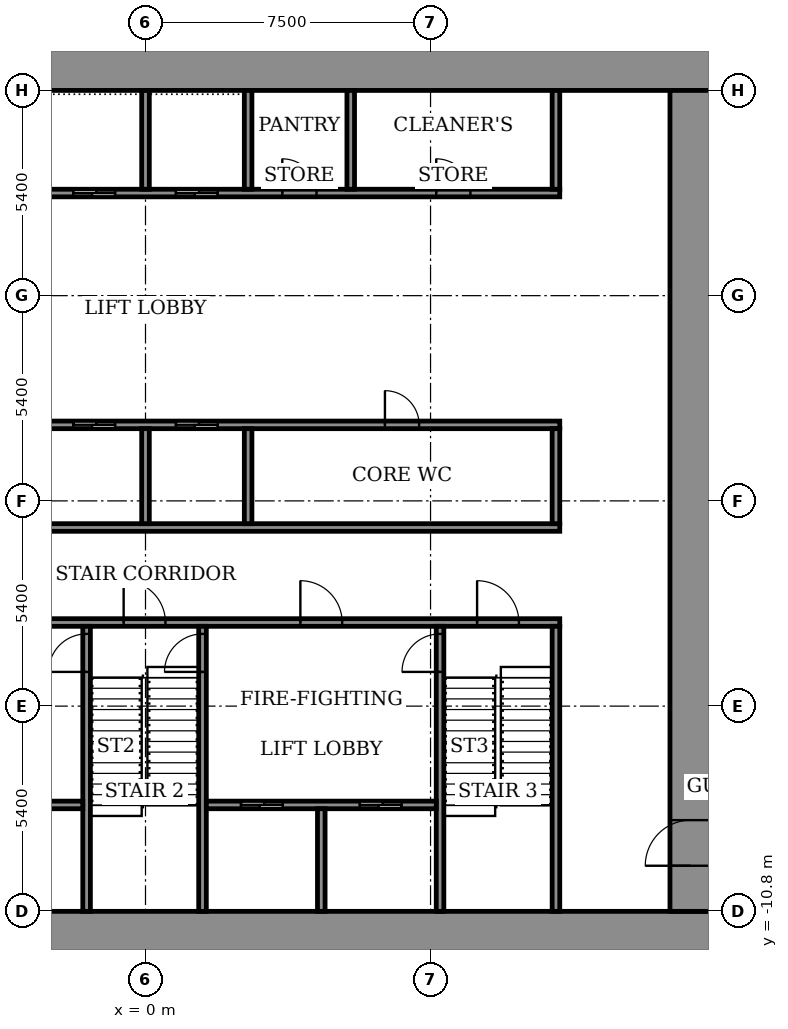
"""IFC4 building model, lengths in metres.
Left out: names, types, materials, properties, quantities, classifications, styles, units other than length and angle.
Written with IfcOpenShell. Run it as: python <this file> out.ifc"""

import sys

from ifc_helpers import new_model, si_unit, direction, frame, frame_2d, origin, place, context, subcontext, project, spatial, rectangle, extrude, element, fill, save


model = new_model("IFC4")
c1 = context("Model", 3, precision=1e-05, world=origin(), true_north=direction((0.0, 1.0)))
c2 = subcontext(c1, "Body", "Model", "MODEL_VIEW")
j1 = project(units=[si_unit("LENGTHUNIT", "METRE"), si_unit("PLANEANGLEUNIT", "RADIAN")], contexts=[c1])
p1 = place(None, origin())
s1 = spatial("IfcSite", under=j1, at=p1, CompositionType="ELEMENT")
p2 = place(p1, origin())
s2 = spatial("IfcBuilding", under=s1, at=p2, CompositionType="ELEMENT")
p3 = place(p2, frame((0.0, 0.0, 74.7)))
s3 = spatial("IfcBuildingStorey", under=s2, at=p3, CompositionType="ELEMENT", Elevation=74.7)
for number, where, z_axis, x_axis in (
    (1, (-14.9, -11.35, 0.0), (0.0, 0.0, 1.0), (1.0, 0.0, 0.0)),
    (2, (-14.9, 11.35, 0.0), (0.0, 0.0, 1.0), (1.0, 0.0, 0.0)),
):
    element("IfcWall", number, at=place(p3, frame(where, z_axis=z_axis, x_axis=x_axis)), inside=s3, PredefinedType="SHEAR", context=c2, shape_type="SweptSolid", body=[
        extrude(rectangle(XDim=29.8, YDim=1.1, at=frame_2d((14.9, 0.0))), origin(), (0.0, 0.0, 1.0), 4.6),
    ])
p4 = place(p3, frame((14.35, -10.8, 0.0), z_axis=(0.0, 0.0, 1.0), x_axis=(0.0, 1.0, 0.0)))
e3 = element("IfcWall", 3, at=p4, inside=s3, PredefinedType="SHEAR", context=c2, shape_type="SweptSolid", body=[
    extrude(rectangle(XDim=21.6, YDim=1.1, at=frame_2d((10.8, 0.0))), origin(), (0.0, 0.0, 1.0), 4.6),
])
p5 = place(p4, frame((1.2, 0.0, 0.0)))
e4 = element("IfcOpeningElement", 4, at=p5, cuts=e3, PredefinedType="OPENING", context=c2, shape_type="SweptSolid", body=[
    extrude(rectangle(XDim=1.2, YDim=2.1, at=frame_2d((0.6, 1.05))), frame((0.0, 0.56, 0.0), z_axis=(0.0, -1.0, 0.0), x_axis=(1.0, 0.0, 0.0)), (0.0, 0.0, 1.0), 1.12),
])
p6 = place(p3, frame((-10.9, -3.2, 0.0), z_axis=(0.0, 0.0, 1.0), x_axis=(1.0, 0.0, 0.0)))
e5 = element("IfcWall", 5, at=p6, inside=s3, PredefinedType="SHEAR", context=c2, shape_type="SweptSolid", body=[
    extrude(rectangle(XDim=21.8, YDim=0.2, at=frame_2d((10.9, 0.0))), origin(), (0.0, 0.0, 1.0), 4.05),
])
p7 = place(p6, frame((1.075, 0.0, 0.0)))
e6 = element("IfcOpeningElement", 6, at=p7, cuts=e5, PredefinedType="OPENING", context=c2, shape_type="SweptSolid", body=[
    extrude(rectangle(XDim=1.1, YDim=2.1, at=frame_2d((0.55, 1.05))), frame((0.0, 0.11, 0.0), z_axis=(0.0, -1.0, 0.0), x_axis=(1.0, 0.0, 0.0)), (0.0, 0.0, 1.0), 0.22),
])
p8 = place(p6, frame((10.325, 0.0, 0.0)))
e7 = element("IfcOpeningElement", 7, at=p8, cuts=e5, PredefinedType="OPENING", context=c2, shape_type="SweptSolid", body=[
    extrude(rectangle(XDim=1.1, YDim=2.1, at=frame_2d((0.55, 1.05))), frame((0.0, 0.11, 0.0), z_axis=(0.0, -1.0, 0.0), x_axis=(1.0, 0.0, 0.0)), (0.0, 0.0, 1.0), 0.22),
])
p9 = place(p6, frame((19.625, 0.0, 0.0)))
e8 = element("IfcOpeningElement", 8, at=p9, cuts=e5, PredefinedType="OPENING", context=c2, shape_type="SweptSolid", body=[
    extrude(rectangle(XDim=1.1, YDim=2.1, at=frame_2d((0.55, 1.05))), frame((0.0, 0.11, 0.0), z_axis=(0.0, -1.0, 0.0), x_axis=(1.0, 0.0, 0.0)), (0.0, 0.0, 1.0), 0.22),
])
p10 = place(p6, frame((5.7, 0.0, 0.0)))
e9 = element("IfcOpeningElement", 9, at=p10, cuts=e5, PredefinedType="OPENING", context=c2, shape_type="SweptSolid", body=[
    extrude(rectangle(XDim=1.1, YDim=2.1, at=frame_2d((0.55, 1.05))), frame((0.0, 0.11, 0.0), z_axis=(0.0, -1.0, 0.0), x_axis=(1.0, 0.0, 0.0)), (0.0, 0.0, 1.0), 0.22),
])
p11 = place(p6, frame((14.975, 0.0, 0.0)))
e10 = element("IfcOpeningElement", 10, at=p11, cuts=e5, PredefinedType="OPENING", context=c2, shape_type="SweptSolid", body=[
    extrude(rectangle(XDim=1.1, YDim=2.1, at=frame_2d((0.55, 1.05))), frame((0.0, 0.11, 0.0), z_axis=(0.0, -1.0, 0.0), x_axis=(1.0, 0.0, 0.0)), (0.0, 0.0, 1.0), 0.22),
])
p12 = place(p3, frame((-10.9, -0.7, 0.0), z_axis=(0.0, 0.0, 1.0), x_axis=(1.0, 0.0, 0.0)))
e11 = element("IfcWall", 11, at=p12, inside=s3, PredefinedType="SHEAR", context=c2, shape_type="SweptSolid", body=[
    extrude(rectangle(XDim=21.8, YDim=0.2, at=frame_2d((10.9, 0.0))), origin(), (0.0, 0.0, 1.0), 4.05),
])
p13 = place(p3, frame((-10.9, 2.0, 0.0), z_axis=(0.0, 0.0, 1.0), x_axis=(1.0, 0.0, 0.0)))
e12 = element("IfcWall", 12, at=p13, inside=s3, PredefinedType="SHEAR", context=c2, shape_type="SweptSolid", body=[
    extrude(rectangle(XDim=21.8, YDim=0.2, at=frame_2d((10.9, 0.0))), origin(), (0.0, 0.0, 1.0), 4.05),
])
p14 = place(p13, frame((0.9, 0.0, 0.0)))
e13 = element("IfcOpeningElement", 13, at=p14, cuts=e12, PredefinedType="OPENING", context=c2, shape_type="SweptSolid", body=[
    extrude(rectangle(XDim=1.1, YDim=2.1, at=frame_2d((0.55, 1.05))), frame((0.0, 0.11, 0.0), z_axis=(0.0, -1.0, 0.0), x_axis=(1.0, 0.0, 0.0)), (0.0, 0.0, 1.0), 0.22),
])
p15 = place(p13, frame((3.6, 0.0, 0.0)))
e14 = element("IfcOpeningElement", 14, at=p15, cuts=e12, PredefinedType="OPENING", context=c2, shape_type="SweptSolid", body=[
    extrude(rectangle(XDim=1.1, YDim=2.1, at=frame_2d((0.55, 1.05))), frame((0.0, 0.11, 0.0), z_axis=(0.0, -1.0, 0.0), x_axis=(1.0, 0.0, 0.0)), (0.0, 0.0, 1.0), 0.22),
])
p16 = place(p13, frame((6.3, 0.0, 0.0)))
e15 = element("IfcOpeningElement", 15, at=p16, cuts=e12, PredefinedType="OPENING", context=c2, shape_type="SweptSolid", body=[
    extrude(rectangle(XDim=1.1, YDim=2.1, at=frame_2d((0.55, 1.05))), frame((0.0, 0.11, 0.0), z_axis=(0.0, -1.0, 0.0), x_axis=(1.0, 0.0, 0.0)), (0.0, 0.0, 1.0), 0.22),
])
p17 = place(p13, frame((9.0, 0.0, 0.0)))
e16 = element("IfcOpeningElement", 16, at=p17, cuts=e12, PredefinedType="OPENING", context=c2, shape_type="SweptSolid", body=[
    extrude(rectangle(XDim=1.1, YDim=2.1, at=frame_2d((0.55, 1.05))), frame((0.0, 0.11, 0.0), z_axis=(0.0, -1.0, 0.0), x_axis=(1.0, 0.0, 0.0)), (0.0, 0.0, 1.0), 0.22),
])
p18 = place(p13, frame((11.7, 0.0, 0.0)))
e17 = element("IfcOpeningElement", 17, at=p18, cuts=e12, PredefinedType="OPENING", context=c2, shape_type="SweptSolid", body=[
    extrude(rectangle(XDim=1.1, YDim=2.1, at=frame_2d((0.55, 1.05))), frame((0.0, 0.11, 0.0), z_axis=(0.0, -1.0, 0.0), x_axis=(1.0, 0.0, 0.0)), (0.0, 0.0, 1.0), 0.22),
])
p19 = place(p13, frame((17.2, 0.0, 0.0)))
e18 = element("IfcOpeningElement", 18, at=p19, cuts=e12, PredefinedType="OPENING", context=c2, shape_type="SweptSolid", body=[
    extrude(rectangle(XDim=0.9, YDim=2.1, at=frame_2d((0.45, 1.05))), frame((0.0, 0.11, 0.0), z_axis=(0.0, -1.0, 0.0), x_axis=(1.0, 0.0, 0.0)), (0.0, 0.0, 1.0), 0.22),
])
p20 = place(p3, frame((-10.9, 8.1, 0.0), z_axis=(0.0, 0.0, 1.0), x_axis=(1.0, 0.0, 0.0)))
e19 = element("IfcWall", 19, at=p20, inside=s3, PredefinedType="SHEAR", context=c2, shape_type="SweptSolid", body=[
    extrude(rectangle(XDim=21.8, YDim=0.2, at=frame_2d((10.9, 0.0))), origin(), (0.0, 0.0, 1.0), 4.05),
])
p21 = place(p20, frame((0.9, 0.0, 0.0)))
e20 = element("IfcOpeningElement", 20, at=p21, cuts=e19, PredefinedType="OPENING", context=c2, shape_type="SweptSolid", body=[
    extrude(rectangle(XDim=1.1, YDim=2.1, at=frame_2d((0.55, 1.05))), frame((0.0, 0.11, 0.0), z_axis=(0.0, -1.0, 0.0), x_axis=(1.0, 0.0, 0.0)), (0.0, 0.0, 1.0), 0.22),
])
p22 = place(p20, frame((3.6, 0.0, 0.0)))
e21 = element("IfcOpeningElement", 21, at=p22, cuts=e19, PredefinedType="OPENING", context=c2, shape_type="SweptSolid", body=[
    extrude(rectangle(XDim=1.1, YDim=2.1, at=frame_2d((0.55, 1.05))), frame((0.0, 0.11, 0.0), z_axis=(0.0, -1.0, 0.0), x_axis=(1.0, 0.0, 0.0)), (0.0, 0.0, 1.0), 0.22),
])
p23 = place(p20, frame((6.3, 0.0, 0.0)))
e22 = element("IfcOpeningElement", 22, at=p23, cuts=e19, PredefinedType="OPENING", context=c2, shape_type="SweptSolid", body=[
    extrude(rectangle(XDim=1.1, YDim=2.1, at=frame_2d((0.55, 1.05))), frame((0.0, 0.11, 0.0), z_axis=(0.0, -1.0, 0.0), x_axis=(1.0, 0.0, 0.0)), (0.0, 0.0, 1.0), 0.22),
])
p24 = place(p20, frame((9.0, 0.0, 0.0)))
e23 = element("IfcOpeningElement", 23, at=p24, cuts=e19, PredefinedType="OPENING", context=c2, shape_type="SweptSolid", body=[
    extrude(rectangle(XDim=1.1, YDim=2.1, at=frame_2d((0.55, 1.05))), frame((0.0, 0.11, 0.0), z_axis=(0.0, -1.0, 0.0), x_axis=(1.0, 0.0, 0.0)), (0.0, 0.0, 1.0), 0.22),
])
p25 = place(p20, frame((11.7, 0.0, 0.0)))
e24 = element("IfcOpeningElement", 24, at=p25, cuts=e19, PredefinedType="OPENING", context=c2, shape_type="SweptSolid", body=[
    extrude(rectangle(XDim=1.1, YDim=2.1, at=frame_2d((0.55, 1.05))), frame((0.0, 0.11, 0.0), z_axis=(0.0, -1.0, 0.0), x_axis=(1.0, 0.0, 0.0)), (0.0, 0.0, 1.0), 0.22),
])
p26 = place(p20, frame((14.5, 0.0, 0.0)))
e25 = element("IfcOpeningElement", 25, at=p26, cuts=e19, PredefinedType="OPENING", context=c2, shape_type="SweptSolid", body=[
    extrude(rectangle(XDim=0.9, YDim=2.1, at=frame_2d((0.45, 1.05))), frame((0.0, 0.11, 0.0), z_axis=(0.0, -1.0, 0.0), x_axis=(1.0, 0.0, 0.0)), (0.0, 0.0, 1.0), 0.22),
])
p27 = place(p20, frame((18.55, 0.0, 0.0)))
e26 = element("IfcOpeningElement", 26, at=p27, cuts=e19, PredefinedType="OPENING", context=c2, shape_type="SweptSolid", body=[
    extrude(rectangle(XDim=0.9, YDim=2.1, at=frame_2d((0.45, 1.05))), frame((0.0, 0.11, 0.0), z_axis=(0.0, -1.0, 0.0), x_axis=(1.0, 0.0, 0.0)), (0.0, 0.0, 1.0), 0.22),
])
p28 = place(p3, frame((-1.55, -10.8, 0.0), z_axis=(0.0, 0.0, 1.0), x_axis=(0.0, 1.0, 0.0)))
e27 = element("IfcWall", 27, at=p28, inside=s3, PredefinedType="SHEAR", context=c2, shape_type="SweptSolid", body=[
    extrude(rectangle(XDim=7.5, YDim=0.2, at=frame_2d((3.75, 0.0))), origin(), (0.0, 0.0, 1.0), 4.05),
])
p29 = place(p28, frame((6.3, 0.0, 0.0)))
e28 = element("IfcOpeningElement", 28, at=p29, cuts=e27, PredefinedType="OPENING", context=c2, shape_type="SweptSolid", body=[
    extrude(rectangle(XDim=1.0, YDim=2.1, at=frame_2d((0.5, 1.05))), frame((0.0, 0.11, 0.0), z_axis=(0.0, -1.0, 0.0), x_axis=(1.0, 0.0, 0.0)), (0.0, 0.0, 1.0), 0.22),
])
p30 = place(p3, frame((1.5, -10.8, 0.0), z_axis=(0.0, 0.0, 1.0), x_axis=(0.0, 1.0, 0.0)))
e29 = element("IfcWall", 29, at=p30, inside=s3, PredefinedType="SHEAR", context=c2, shape_type="SweptSolid", body=[
    extrude(rectangle(XDim=7.5, YDim=0.2, at=frame_2d((3.75, 0.0))), origin(), (0.0, 0.0, 1.0), 4.05),
])
p31 = place(p30, frame((6.3, 0.0, 0.0)))
e30 = element("IfcOpeningElement", 30, at=p31, cuts=e29, PredefinedType="OPENING", context=c2, shape_type="SweptSolid", body=[
    extrude(rectangle(XDim=1.0, YDim=2.1, at=frame_2d((0.5, 1.05))), frame((0.0, 0.11, 0.0), z_axis=(0.0, -1.0, 0.0), x_axis=(1.0, 0.0, 0.0)), (0.0, 0.0, 1.0), 0.22),
])
p32 = place(p3, frame((7.75, -10.8, 0.0), z_axis=(0.0, 0.0, 1.0), x_axis=(0.0, 1.0, 0.0)))
e31 = element("IfcWall", 31, at=p32, inside=s3, PredefinedType="SHEAR", context=c2, shape_type="SweptSolid", body=[
    extrude(rectangle(XDim=7.5, YDim=0.2, at=frame_2d((3.75, 0.0))), origin(), (0.0, 0.0, 1.0), 4.05),
])
p33 = place(p32, frame((6.3, 0.0, 0.0)))
e32 = element("IfcOpeningElement", 32, at=p33, cuts=e31, PredefinedType="OPENING", context=c2, shape_type="SweptSolid", body=[
    extrude(rectangle(XDim=1.0, YDim=2.1, at=frame_2d((0.5, 1.05))), frame((0.0, 0.11, 0.0), z_axis=(0.0, -1.0, 0.0), x_axis=(1.0, 0.0, 0.0)), (0.0, 0.0, 1.0), 0.22),
])
p34 = place(p3, frame((10.8, -10.8, 0.0), z_axis=(0.0, 0.0, 1.0), x_axis=(0.0, 1.0, 0.0)))
e33 = element("IfcWall", 33, at=p34, inside=s3, PredefinedType="SHEAR", context=c2, shape_type="SweptSolid", body=[
    extrude(rectangle(XDim=7.5, YDim=0.2, at=frame_2d((3.75, 0.0))), origin(), (0.0, 0.0, 1.0), 4.05),
])
p35 = place(p3, frame((-7.65, -8.0, 0.0), z_axis=(0.0, 0.0, 1.0), x_axis=(1.0, 0.0, 0.0)))
e34 = element("IfcWall", 34, at=p35, inside=s3, PredefinedType="SHEAR", context=c2, shape_type="SweptSolid", body=[
    extrude(rectangle(XDim=6.0, YDim=0.2, at=frame_2d((3.0, 0.0))), origin(), (0.0, 0.0, 1.0), 4.05),
])
p36 = place(p35, frame((0.9, 0.0, 0.0)))
e35 = element("IfcOpeningElement", 35, at=p36, cuts=e34, PredefinedType="OPENING", context=c2, shape_type="SweptSolid", body=[
    extrude(rectangle(XDim=1.1, YDim=2.1, at=frame_2d((0.55, 1.05))), frame((0.0, 0.11, 0.0), z_axis=(0.0, -1.0, 0.0), x_axis=(1.0, 0.0, 0.0)), (0.0, 0.0, 1.0), 0.22),
])
p37 = place(p35, frame((4.0, 0.0, 0.0)))
e36 = element("IfcOpeningElement", 36, at=p37, cuts=e34, PredefinedType="OPENING", context=c2, shape_type="SweptSolid", body=[
    extrude(rectangle(XDim=1.1, YDim=2.1, at=frame_2d((0.55, 1.05))), frame((0.0, 0.11, 0.0), z_axis=(0.0, -1.0, 0.0), x_axis=(1.0, 0.0, 0.0)), (0.0, 0.0, 1.0), 0.22),
])
p38 = place(p3, frame((1.6, -8.0, 0.0), z_axis=(0.0, 0.0, 1.0), x_axis=(1.0, 0.0, 0.0)))
e37 = element("IfcWall", 37, at=p38, inside=s3, PredefinedType="SHEAR", context=c2, shape_type="SweptSolid", body=[
    extrude(rectangle(XDim=6.05, YDim=0.2, at=frame_2d((3.025, 0.0))), origin(), (0.0, 0.0, 1.0), 4.05),
])
p39 = place(p38, frame((0.913, 0.0, 0.0)))
e38 = element("IfcOpeningElement", 38, at=p39, cuts=e37, PredefinedType="OPENING", context=c2, shape_type="SweptSolid", body=[
    extrude(rectangle(XDim=1.1, YDim=2.1, at=frame_2d((0.55, 1.05))), frame((0.0, 0.11, 0.0), z_axis=(0.0, -1.0, 0.0), x_axis=(1.0, 0.0, 0.0)), (0.0, 0.0, 1.0), 0.22),
])
p40 = place(p38, frame((4.038, 0.0, 0.0)))
e39 = element("IfcOpeningElement", 39, at=p40, cuts=e37, PredefinedType="OPENING", context=c2, shape_type="SweptSolid", body=[
    extrude(rectangle(XDim=1.1, YDim=2.1, at=frame_2d((0.55, 1.05))), frame((0.0, 0.11, 0.0), z_axis=(0.0, -1.0, 0.0), x_axis=(1.0, 0.0, 0.0)), (0.0, 0.0, 1.0), 0.22),
])
p41 = place(p3, frame((4.625, -10.8, 0.0), z_axis=(0.0, 0.0, 1.0), x_axis=(0.0, 1.0, 0.0)))
e40 = element("IfcWall", 40, at=p41, inside=s3, PredefinedType="SHEAR", context=c2, shape_type="SweptSolid", body=[
    extrude(rectangle(XDim=2.7, YDim=0.2, at=frame_2d((1.35, 0.0))), origin(), (0.0, 0.0, 1.0), 4.05),
])
for number, where, z_axis, x_axis in (
    (41, (0.0, -0.6, 0.0), (0.0, 0.0, 1.0), (0.0, 1.0, 0.0)),
    (42, (2.7, -0.6, 0.0), (0.0, 0.0, 1.0), (0.0, 1.0, 0.0)),
):
    element("IfcWall", number, at=place(p3, frame(where, z_axis=z_axis, x_axis=x_axis)), inside=s3, PredefinedType="SHEAR", context=c2, shape_type="SweptSolid", body=[
        extrude(rectangle(XDim=2.5, YDim=0.2, at=frame_2d((1.25, 0.0))), origin(), (0.0, 0.0, 1.0), 4.05),
    ])
p42 = place(p3, frame((10.8, -0.6, 0.0), z_axis=(0.0, 0.0, 1.0), x_axis=(0.0, 1.0, 0.0)))
e43 = element("IfcWall", 43, at=p42, inside=s3, PredefinedType="STANDARD", context=c2, shape_type="SweptSolid", body=[
    extrude(rectangle(XDim=2.5, YDim=0.2, at=frame_2d((1.25, 0.0))), origin(), (0.0, 0.0, 1.0), 4.05),
])
for number, where, z_axis, x_axis in (
    (44, (0.0, 8.2, 0.0), (0.0, 0.0, 1.0), (0.0, 1.0, 0.0)),
    (45, (2.7, 8.2, 0.0), (0.0, 0.0, 1.0), (0.0, 1.0, 0.0)),
):
    element("IfcWall", number, at=place(p3, frame(where, z_axis=z_axis, x_axis=x_axis)), inside=s3, PredefinedType="SHEAR", context=c2, shape_type="SweptSolid", body=[
        extrude(rectangle(XDim=2.6, YDim=0.2, at=frame_2d((1.3, 0.0))), origin(), (0.0, 0.0, 1.0), 4.05),
    ])
for number, where, z_axis, x_axis in (
    (46, (5.4, 8.2, 0.0), (0.0, 0.0, 1.0), (0.0, 1.0, 0.0)),
    (47, (10.8, 8.2, 0.0), (0.0, 0.0, 1.0), (0.0, 1.0, 0.0)),
):
    element("IfcWall", number, at=place(p3, frame(where, z_axis=z_axis, x_axis=x_axis)), inside=s3, PredefinedType="STANDARD", context=c2, shape_type="SweptSolid", body=[
        extrude(rectangle(XDim=2.6, YDim=0.2, at=frame_2d((1.3, 0.0))), origin(), (0.0, 0.0, 1.0), 4.05),
    ])
p43 = place(p5, origin())
e48 = element("IfcDoor", 48, at=p43, inside=s3, OperationType="DOUBLE_DOOR_SINGLE_SWING", PredefinedType="DOOR", context=c2, shape_type="SweptSolid", body=[
    extrude(rectangle(XDim=1.2, YDim=2.1, at=frame_2d((0.6, 1.05))), frame((0.0, 0.025, 0.0), z_axis=(0.0, -1.0, 0.0), x_axis=(1.0, 0.0, 0.0)), (0.0, 0.0, 1.0), 0.05),
])
fill(e4, e48)
p44 = place(p17, origin())
e49 = element("IfcDoor", 49, at=p44, inside=s3, OperationType="SLIDING_TO_LEFT", PredefinedType="DOOR", context=c2, shape_type="SweptSolid", body=[
    extrude(rectangle(XDim=1.1, YDim=2.1, at=frame_2d((0.55, 1.05))), frame((0.0, 0.025, 0.0), z_axis=(0.0, -1.0, 0.0), x_axis=(1.0, 0.0, 0.0)), (0.0, 0.0, 1.0), 0.05),
])
fill(e16, e49)
p45 = place(p18, origin())
e50 = element("IfcDoor", 50, at=p45, inside=s3, OperationType="SLIDING_TO_LEFT", PredefinedType="DOOR", context=c2, shape_type="SweptSolid", body=[
    extrude(rectangle(XDim=1.1, YDim=2.1, at=frame_2d((0.55, 1.05))), frame((0.0, 0.025, 0.0), z_axis=(0.0, -1.0, 0.0), x_axis=(1.0, 0.0, 0.0)), (0.0, 0.0, 1.0), 0.05),
])
fill(e17, e50)
p46 = place(p24, origin())
e51 = element("IfcDoor", 51, at=p46, inside=s3, OperationType="SLIDING_TO_LEFT", PredefinedType="DOOR", context=c2, shape_type="SweptSolid", body=[
    extrude(rectangle(XDim=1.1, YDim=2.1, at=frame_2d((0.55, 1.05))), frame((0.0, 0.025, 0.0), z_axis=(0.0, -1.0, 0.0), x_axis=(1.0, 0.0, 0.0)), (0.0, 0.0, 1.0), 0.05),
])
fill(e23, e51)
p47 = place(p25, origin())
e52 = element("IfcDoor", 52, at=p47, inside=s3, OperationType="SLIDING_TO_LEFT", PredefinedType="DOOR", context=c2, shape_type="SweptSolid", body=[
    extrude(rectangle(XDim=1.1, YDim=2.1, at=frame_2d((0.55, 1.05))), frame((0.0, 0.025, 0.0), z_axis=(0.0, -1.0, 0.0), x_axis=(1.0, 0.0, 0.0)), (0.0, 0.0, 1.0), 0.05),
])
fill(e24, e52)
p48 = place(p19, origin())
e53 = element("IfcDoor", 53, at=p48, inside=s3, OperationType="SINGLE_SWING_RIGHT", PredefinedType="DOOR", context=c2, shape_type="SweptSolid", body=[
    extrude(rectangle(XDim=0.9, YDim=2.1, at=frame_2d((0.45, 1.05))), frame((0.0, 0.025, 0.0), z_axis=(0.0, -1.0, 0.0), x_axis=(1.0, 0.0, 0.0)), (0.0, 0.0, 1.0), 0.05),
])
fill(e18, e53)
p49 = place(p26, origin())
e54 = element("IfcDoor", 54, at=p49, inside=s3, OperationType="SINGLE_SWING_RIGHT", PredefinedType="DOOR", context=c2, shape_type="SweptSolid", body=[
    extrude(rectangle(XDim=0.9, YDim=2.1, at=frame_2d((0.45, 1.05))), frame((0.0, 0.025, 0.0), z_axis=(0.0, -1.0, 0.0), x_axis=(1.0, 0.0, 0.0)), (0.0, 0.0, 1.0), 0.05),
])
fill(e25, e54)
p50 = place(p27, origin())
e55 = element("IfcDoor", 55, at=p50, inside=s3, OperationType="SINGLE_SWING_RIGHT", PredefinedType="DOOR", context=c2, shape_type="SweptSolid", body=[
    extrude(rectangle(XDim=0.9, YDim=2.1, at=frame_2d((0.45, 1.05))), frame((0.0, 0.025, 0.0), z_axis=(0.0, -1.0, 0.0), x_axis=(1.0, 0.0, 0.0)), (0.0, 0.0, 1.0), 0.05),
])
fill(e26, e55)
p51 = place(p39, origin())
e56 = element("IfcDoor", 56, at=p51, inside=s3, OperationType="SLIDING_TO_LEFT", PredefinedType="DOOR", context=c2, shape_type="SweptSolid", body=[
    extrude(rectangle(XDim=1.1, YDim=2.1, at=frame_2d((0.55, 1.05))), frame((0.0, 0.025, 0.0), z_axis=(0.0, -1.0, 0.0), x_axis=(1.0, 0.0, 0.0)), (0.0, 0.0, 1.0), 0.05),
])
fill(e38, e56)
p52 = place(p40, origin())
e57 = element("IfcDoor", 57, at=p52, inside=s3, OperationType="SLIDING_TO_LEFT", PredefinedType="DOOR", context=c2, shape_type="SweptSolid", body=[
    extrude(rectangle(XDim=1.1, YDim=2.1, at=frame_2d((0.55, 1.05))), frame((0.0, 0.025, 0.0), z_axis=(0.0, -1.0, 0.0), x_axis=(1.0, 0.0, 0.0)), (0.0, 0.0, 1.0), 0.05),
])
fill(e39, e57)
p53 = place(p8, origin())
e58 = element("IfcDoor", 58, at=p53, inside=s3, OperationType="SINGLE_SWING_RIGHT", PredefinedType="DOOR", context=c2, shape_type="SweptSolid", body=[
    extrude(rectangle(XDim=1.1, YDim=2.1, at=frame_2d((0.55, 1.05))), frame((0.0, 0.025, 0.0), z_axis=(0.0, -1.0, 0.0), x_axis=(1.0, 0.0, 0.0)), (0.0, 0.0, 1.0), 0.05),
])
fill(e7, e58)
p54 = place(p9, origin())
e59 = element("IfcDoor", 59, at=p54, inside=s3, OperationType="SINGLE_SWING_RIGHT", PredefinedType="DOOR", context=c2, shape_type="SweptSolid", body=[
    extrude(rectangle(XDim=1.1, YDim=2.1, at=frame_2d((0.55, 1.05))), frame((0.0, 0.025, 0.0), z_axis=(0.0, -1.0, 0.0), x_axis=(1.0, 0.0, 0.0)), (0.0, 0.0, 1.0), 0.05),
])
fill(e8, e59)
p55 = place(p11, origin())
e60 = element("IfcDoor", 60, at=p55, inside=s3, OperationType="SINGLE_SWING_LEFT", PredefinedType="DOOR", context=c2, shape_type="SweptSolid", body=[
    extrude(rectangle(XDim=1.1, YDim=2.1, at=frame_2d((0.55, 1.05))), frame((0.0, 0.025, 0.0), z_axis=(0.0, -1.0, 0.0), x_axis=(1.0, 0.0, 0.0)), (0.0, 0.0, 1.0), 0.05),
])
fill(e10, e60)
p56 = place(p29, origin())
e61 = element("IfcDoor", 61, at=p56, inside=s3, OperationType="SINGLE_SWING_RIGHT", PredefinedType="DOOR", context=c2, shape_type="SweptSolid", body=[
    extrude(rectangle(XDim=1.0, YDim=2.1, at=frame_2d((0.5, 1.05))), frame((0.0, 0.025, 0.0), z_axis=(0.0, -1.0, 0.0), x_axis=(1.0, 0.0, 0.0)), (0.0, 0.0, 1.0), 0.05),
])
fill(e28, e61)
p57 = place(p31, origin())
e62 = element("IfcDoor", 62, at=p57, inside=s3, OperationType="SINGLE_SWING_RIGHT", PredefinedType="DOOR", context=c2, shape_type="SweptSolid", body=[
    extrude(rectangle(XDim=1.0, YDim=2.1, at=frame_2d((0.5, 1.05))), frame((0.0, 0.025, 0.0), z_axis=(0.0, -1.0, 0.0), x_axis=(1.0, 0.0, 0.0)), (0.0, 0.0, 1.0), 0.05),
])
fill(e30, e62)
p58 = place(p33, origin())
e63 = element("IfcDoor", 63, at=p58, inside=s3, OperationType="SINGLE_SWING_RIGHT", PredefinedType="DOOR", context=c2, shape_type="SweptSolid", body=[
    extrude(rectangle(XDim=1.0, YDim=2.1, at=frame_2d((0.5, 1.05))), frame((0.0, 0.025, 0.0), z_axis=(0.0, -1.0, 0.0), x_axis=(1.0, 0.0, 0.0)), (0.0, 0.0, 1.0), 0.05),
])
fill(e32, e63)
save(model, sys.argv[1])
